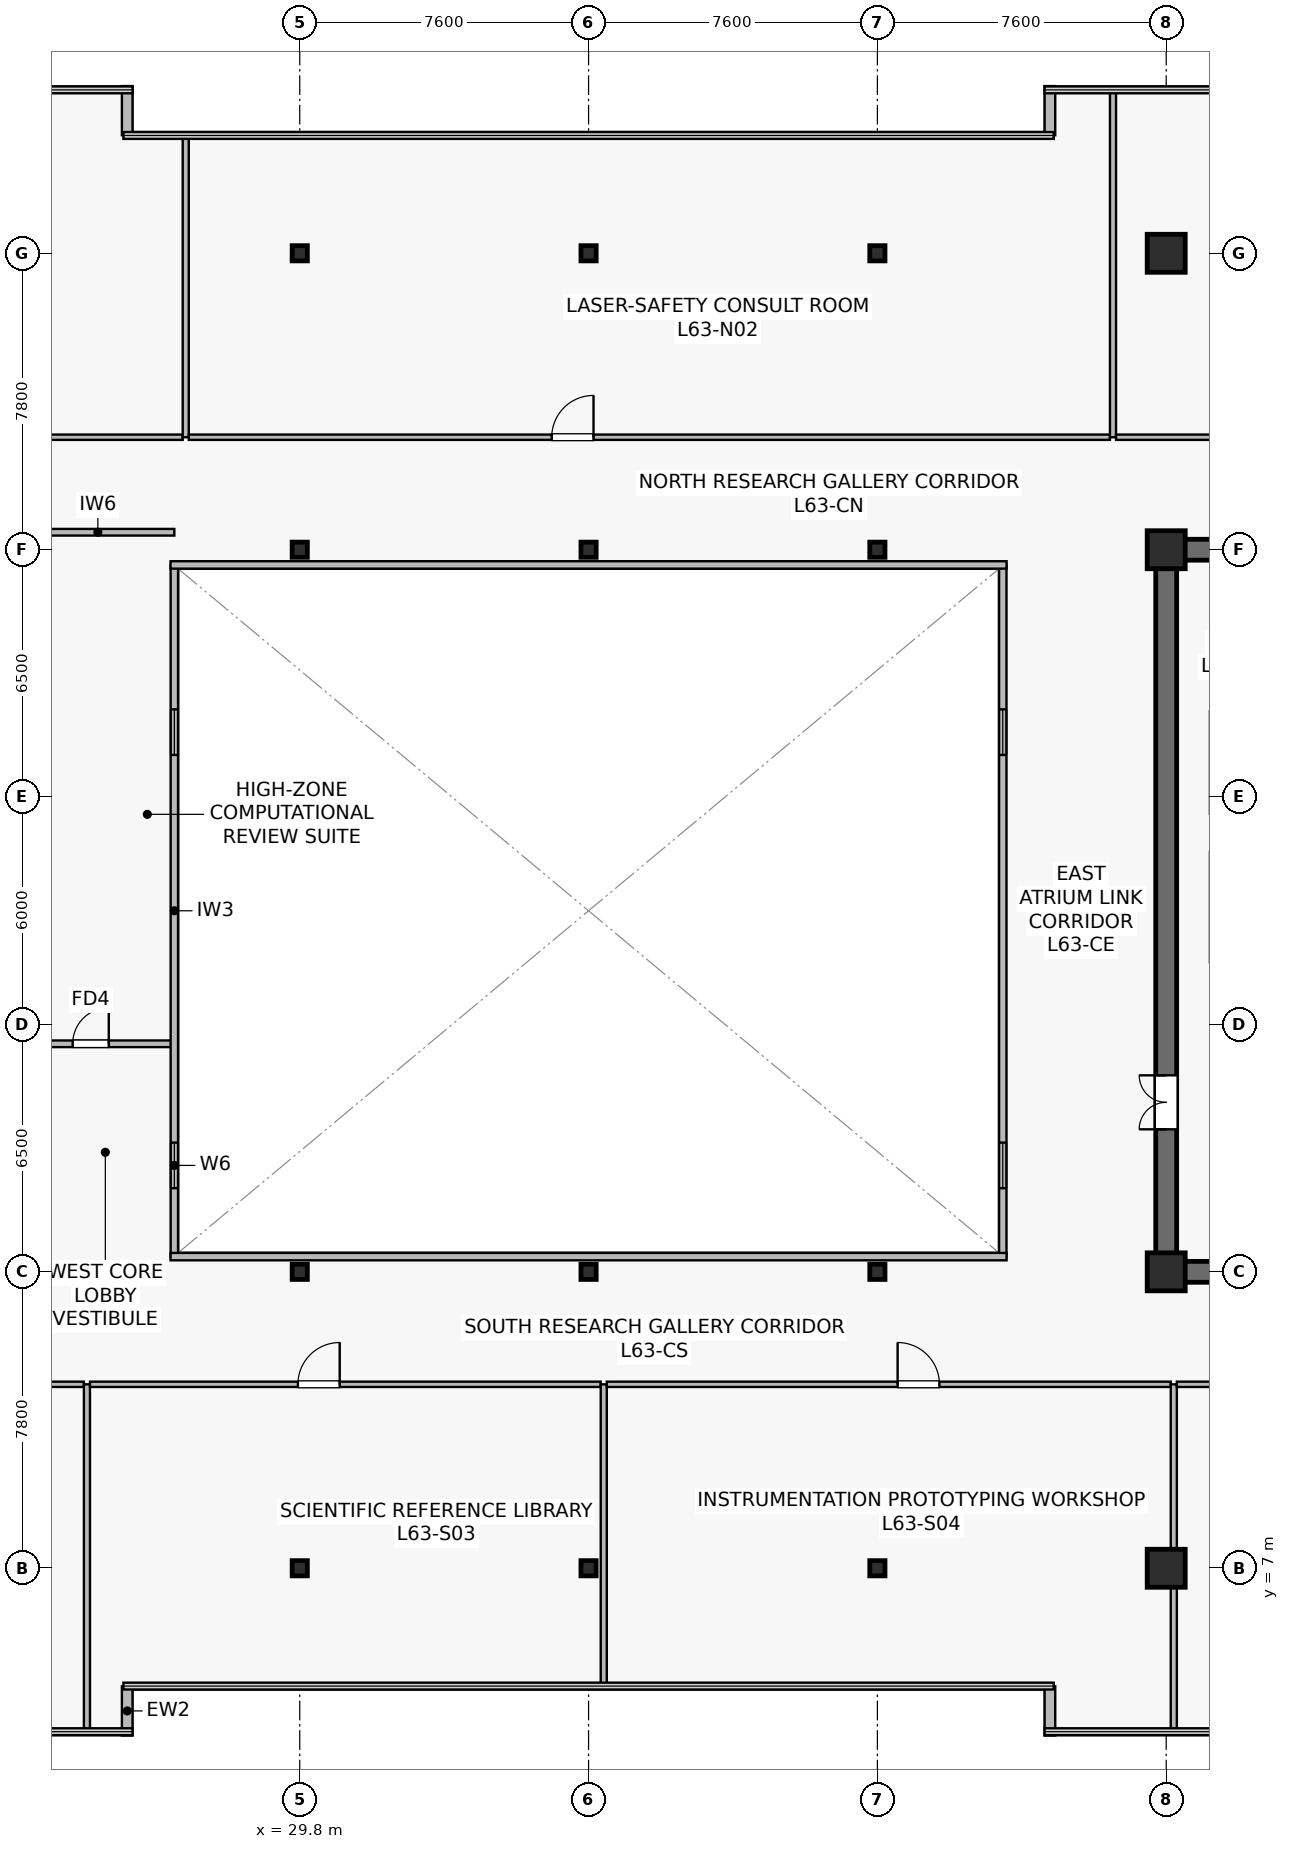
"""IFC4 building model, lengths in metres.
Left out: names, types, materials, properties, quantities, classifications, styles, units other than length and angle.
Written with IfcOpenShell. Run it as: python <this file> out.ifc"""

import sys

from ifc_helpers import new_model, si_unit, direction, frame, frame_2d, origin, origin_2d, place, context, subcontext, project, spatial, rectangle, hollow_rectangle, extrude, source, transform, mapped, element, fill, save


model = new_model("IFC4")
c1 = context("Model", 3, precision=1e-05, world=origin(), true_north=direction((0.0, 1.0)))
c2 = subcontext(c1, "Body", "Model", "MODEL_VIEW")
j1 = project(units=[si_unit("LENGTHUNIT", "METRE"), si_unit("PLANEANGLEUNIT", "RADIAN")], contexts=[c1])
p1 = place(None, origin())
s1 = spatial("IfcSite", under=j1, at=p1, CompositionType="ELEMENT")
p2 = place(p1, origin())
s2 = spatial("IfcBuilding", under=s1, at=p2, CompositionType="ELEMENT")
p3 = place(p2, frame((0.0, 0.0, 262.9)))
s3 = spatial("IfcBuildingStorey", under=s2, at=p3, CompositionType="ELEMENT", Elevation=262.9)
p4 = place(p3, frame((52.325, 14.8, 0.0), z_axis=(0.0, 0.0, 1.0), x_axis=(1.0, 0.0, 0.0)))
e1 = element("IfcWall", 1, at=p4, inside=s3, PredefinedType="SHEAR", context=c2, shape_type="SweptSolid", body=[
    extrude(rectangle(XDim=15.35, YDim=0.55, at=frame_2d((7.675, 0.0))), origin(), (0.0, 0.0, 1.0), 3.8),
])
p5 = place(p3, frame((52.325, 33.8, 0.0), z_axis=(0.0, 0.0, 1.0), x_axis=(1.0, 0.0, 0.0)))
e2 = element("IfcWall", 2, at=p5, inside=s3, PredefinedType="SHEAR", context=c2, shape_type="SweptSolid", body=[
    extrude(rectangle(XDim=15.35, YDim=0.55, at=frame_2d((7.675, 0.0))), origin(), (0.0, 0.0, 1.0), 3.8),
])
p6 = place(p5, frame((6.075, 0.0, 0.0)))
e3 = element("IfcOpeningElement", 3, at=p6, cuts=e2, PredefinedType="OPENING", context=c2, shape_type="SweptSolid", body=[
    extrude(rectangle(XDim=0.95, YDim=2.15, at=frame_2d((0.475, 1.075))), frame((0.0, 0.285, 0.0), z_axis=(0.0, -1.0, 0.0), x_axis=(1.0, 0.0, 0.0)), (0.0, 0.0, 1.0), 0.57),
])
p7 = place(p5, frame((2.535, 0.0, 0.0)))
e4 = element("IfcOpeningElement", 4, at=p7, cuts=e2, PredefinedType="OPENING", context=c2, shape_type="SweptSolid", body=[
    extrude(rectangle(XDim=0.95, YDim=2.15, at=frame_2d((0.475, 1.075))), frame((0.0, 0.285, 0.0), z_axis=(0.0, -1.0, 0.0), x_axis=(1.0, 0.0, 0.0)), (0.0, 0.0, 1.0), 0.57),
])
p8 = place(p3, frame((52.6, 15.075, 0.0), z_axis=(0.0, 0.0, 1.0), x_axis=(0.0, 1.0, 0.0)))
e5 = element("IfcWall", 5, at=p8, inside=s3, PredefinedType="SHEAR", context=c2, shape_type="SweptSolid", body=[
    extrude(rectangle(XDim=18.45, YDim=0.55, at=frame_2d((9.225, 0.0))), origin(), (0.0, 0.0, 1.0), 3.8),
])
p9 = place(p8, frame((3.475, 0.0, 0.0)))
e6 = element("IfcOpeningElement", 6, at=p9, cuts=e5, PredefinedType="OPENING", context=c2, shape_type="SweptSolid", body=[
    extrude(rectangle(XDim=1.42, YDim=2.2, at=frame_2d((0.71, 1.1))), frame((0.0, 0.285, 0.0), z_axis=(0.0, -1.0, 0.0), x_axis=(1.0, 0.0, 0.0)), (0.0, 0.0, 1.0), 0.57),
])
m1 = source(origin(), c2, "Body", "SweptSolid", [
    extrude(rectangle(XDim=1.0, YDim=1.0, at=origin_2d()), origin(), (0.0, 0.0, 1.0), 4.1),
])
for number, where, z_axis, x_axis in (
    (7, (52.6, 7.0, 0.0), (0.0, 0.0, 1.0), (1.0, 0.0, 0.0)),
    (8, (52.6, 14.8, 0.0), (0.0, 0.0, 1.0), (1.0, 0.0, 0.0)),
    (9, (52.6, 33.8, 0.0), (0.0, 0.0, 1.0), (1.0, 0.0, 0.0)),
    (10, (52.6, 41.6, 0.0), (0.0, 0.0, 1.0), (1.0, 0.0, 0.0)),
):
    element("IfcColumn", number, at=place(p3, frame(where, z_axis=z_axis, x_axis=x_axis)), inside=s3, PredefinedType="COLUMN", context=c2, shape_type="MappedRepresentation", body=[
        mapped(m1, transform((0.0, 0.0, 0.0), scale=1.0)),
    ])
m2 = source(origin(), c2, "Body", "SweptSolid", [
    extrude(hollow_rectangle(XDim=0.4, YDim=0.4, WallThickness=0.019, at=origin_2d()), origin(), (0.0, 0.0, 1.0), 4.1),
])
for number, where, z_axis, x_axis in (
    (11, (29.8, 7.0, 0.0), (0.0, 0.0, 1.0), (1.0, 0.0, 0.0)),
    (12, (29.8, 14.8, 0.0), (0.0, 0.0, 1.0), (1.0, 0.0, 0.0)),
    (13, (29.8, 33.8, 0.0), (0.0, 0.0, 1.0), (1.0, 0.0, 0.0)),
    (14, (29.8, 41.6, 0.0), (0.0, 0.0, 1.0), (1.0, 0.0, 0.0)),
    (15, (37.4, 7.0, 0.0), (0.0, 0.0, 1.0), (1.0, 0.0, 0.0)),
    (16, (37.4, 14.8, 0.0), (0.0, 0.0, 1.0), (1.0, 0.0, 0.0)),
    (17, (37.4, 33.8, 0.0), (0.0, 0.0, 1.0), (1.0, 0.0, 0.0)),
    (18, (37.4, 41.6, 0.0), (0.0, 0.0, 1.0), (1.0, 0.0, 0.0)),
    (19, (45.0, 7.0, 0.0), (0.0, 0.0, 1.0), (1.0, 0.0, 0.0)),
    (20, (45.0, 14.8, 0.0), (0.0, 0.0, 1.0), (1.0, 0.0, 0.0)),
    (21, (45.0, 33.8, 0.0), (0.0, 0.0, 1.0), (1.0, 0.0, 0.0)),
    (22, (45.0, 41.6, 0.0), (0.0, 0.0, 1.0), (1.0, 0.0, 0.0)),
):
    element("IfcColumn", number, at=place(p3, frame(where, z_axis=z_axis, x_axis=x_axis)), inside=s3, PredefinedType="COLUMN", context=c2, shape_type="MappedRepresentation", body=[
        mapped(m2, transform((0.0, 0.0, 0.0), scale=1.0)),
    ])
for number, where, z_axis, x_axis in (
    (23, (25.26, 2.6, 0.0), (0.0, 0.0, 1.0), (0.0, 1.0, 0.0)),
    (24, (49.54, 3.893, 0.0), (0.0, 0.0, 1.0), (0.0, -1.0, 0.0)),
    (25, (49.54, 46.0, 0.0), (0.0, 0.0, 1.0), (0.0, -1.0, 0.0)),
    (26, (25.26, 44.707, 0.0), (0.0, 0.0, 1.0), (0.0, 1.0, 0.0)),
):
    element("IfcWall", number, at=place(p3, frame(where, z_axis=z_axis, x_axis=x_axis)), inside=s3, PredefinedType="STANDARD", context=c2, shape_type="SweptSolid", body=[
        extrude(rectangle(XDim=1.293, YDim=0.28, at=frame_2d((0.646, 0.0))), origin(), (0.0, 0.0, 1.0), 3.8),
    ])
p10 = place(p3, frame((22.475, 34.26, 0.0), z_axis=(0.0, 0.0, 1.0), x_axis=(1.0, 0.0, 0.0)))
e27 = element("IfcWall", 27, at=p10, inside=s3, PredefinedType="PARTITIONING", context=c2, shape_type="SweptSolid", body=[
    extrude(rectangle(XDim=4.025, YDim=0.175, at=frame_2d((2.012, 0.0))), origin(), (0.0, 0.0, 1.0), 3.535),
])
p11 = place(p3, frame((22.475, 20.8, 0.0), z_axis=(0.0, 0.0, 1.0), x_axis=(1.0, 0.0, 0.0)))
e28 = element("IfcWall", 28, at=p11, inside=s3, PredefinedType="PARTITIONING", context=c2, shape_type="SweptSolid", body=[
    extrude(rectangle(XDim=4.025, YDim=0.175, at=frame_2d((2.012, 0.0))), origin(), (0.0, 0.0, 1.0), 3.8),
])
p12 = place(p11, frame((1.35, 0.0, 0.0)))
e29 = element("IfcOpeningElement", 29, at=p12, cuts=e28, PredefinedType="OPENING", context=c2, shape_type="SweptSolid", body=[
    extrude(rectangle(XDim=0.95, YDim=2.15, at=frame_2d((0.475, 1.075))), frame((0.0, 0.098, 0.0), z_axis=(0.0, -1.0, 0.0), x_axis=(1.0, 0.0, 0.0)), (0.0, 0.0, 1.0), 0.195),
])
p13 = place(p3, frame((26.5, 15.2, 0.0), z_axis=(0.0, 0.0, 1.0), x_axis=(0.0, 1.0, 0.0)))
e30 = element("IfcWall", 30, at=p13, inside=s3, PredefinedType="SOLIDWALL", context=c2, shape_type="SweptSolid", body=[
    extrude(rectangle(XDim=18.2, YDim=0.195, at=frame_2d((9.1, 0.0))), origin(), (0.0, 0.0, 1.0), 3.8),
])
p14 = place(p13, frame((1.8, 0.0, 0.9)))
e31 = element("IfcOpeningElement", 31, at=p14, cuts=e30, PredefinedType="OPENING", context=c2, shape_type="SweptSolid", body=[
    extrude(rectangle(XDim=1.2, YDim=1.35, at=frame_2d((0.6, 0.675))), frame((0.0, 0.107, 0.0), z_axis=(0.0, -1.0, 0.0), x_axis=(1.0, 0.0, 0.0)), (0.0, 0.0, 1.0), 0.215),
])
p15 = place(p13, frame((13.2, 0.0, 0.9)))
e32 = element("IfcOpeningElement", 32, at=p15, cuts=e30, PredefinedType="OPENING", context=c2, shape_type="SweptSolid", body=[
    extrude(rectangle(XDim=1.2, YDim=1.35, at=frame_2d((0.6, 0.675))), frame((0.0, 0.107, 0.0), z_axis=(0.0, -1.0, 0.0), x_axis=(1.0, 0.0, 0.0)), (0.0, 0.0, 1.0), 0.215),
])
p16 = place(p3, frame((48.3, 15.2, 0.0), z_axis=(0.0, 0.0, 1.0), x_axis=(0.0, 1.0, 0.0)))
e33 = element("IfcWall", 33, at=p16, inside=s3, PredefinedType="SOLIDWALL", context=c2, shape_type="SweptSolid", body=[
    extrude(rectangle(XDim=18.2, YDim=0.195, at=frame_2d((9.1, 0.0))), origin(), (0.0, 0.0, 1.0), 3.8),
])
p17 = place(p16, frame((1.8, 0.0, 0.9)))
e34 = element("IfcOpeningElement", 34, at=p17, cuts=e33, PredefinedType="OPENING", context=c2, shape_type="SweptSolid", body=[
    extrude(rectangle(XDim=1.2, YDim=1.35, at=frame_2d((0.6, 0.675))), frame((0.0, 0.107, 0.0), z_axis=(0.0, -1.0, 0.0), x_axis=(1.0, 0.0, 0.0)), (0.0, 0.0, 1.0), 0.215),
])
p18 = place(p16, frame((13.2, 0.0, 0.9)))
e35 = element("IfcOpeningElement", 35, at=p18, cuts=e33, PredefinedType="OPENING", context=c2, shape_type="SweptSolid", body=[
    extrude(rectangle(XDim=1.2, YDim=1.35, at=frame_2d((0.6, 0.675))), frame((0.0, 0.107, 0.0), z_axis=(0.0, -1.0, 0.0), x_axis=(1.0, 0.0, 0.0)), (0.0, 0.0, 1.0), 0.215),
])
for number, where, z_axis, x_axis in (
    (36, (26.4, 15.2, 0.0), (0.0, 0.0, 1.0), (1.0, 0.0, 0.0)),
    (37, (26.4, 33.4, 0.0), (0.0, 0.0, 1.0), (1.0, 0.0, 0.0)),
):
    element("IfcWall", number, at=place(p3, frame(where, z_axis=z_axis, x_axis=x_axis)), inside=s3, PredefinedType="SOLIDWALL", context=c2, shape_type="SweptSolid", body=[
        extrude(rectangle(XDim=22.0, YDim=0.195, at=frame_2d((11.0, 0.0))), origin(), (0.0, 0.0, 1.0), 3.8),
    ])
p19 = place(p3, frame((13.48, 11.84, 0.0), z_axis=(0.0, 0.0, 1.0), x_axis=(1.0, 0.0, 0.0)))
e38 = element("IfcWall", 38, at=p19, inside=s3, PredefinedType="PARTITIONING", context=c2, shape_type="SweptSolid", body=[
    extrude(rectangle(XDim=10.64, YDim=0.14, at=frame_2d((5.32, 0.0))), origin(), (0.0, 0.0, 1.0), 3.197),
])
p20 = place(p19, frame((5.3, 0.0, 0.0)))
e39 = element("IfcOpeningElement", 39, at=p20, cuts=e38, PredefinedType="OPENING", context=c2, shape_type="SweptSolid", body=[
    extrude(rectangle(XDim=1.1, YDim=2.18, at=frame_2d((0.55, 1.09))), frame((0.0, 0.08, 0.0), z_axis=(0.0, -1.0, 0.0), x_axis=(1.0, 0.0, 0.0)), (0.0, 0.0, 1.0), 0.16),
])
p21 = place(p3, frame((24.2, 2.71, 0.0), z_axis=(0.0, 0.0, 1.0), x_axis=(0.0, 1.0, 0.0)))
e40 = element("IfcWall", 40, at=p21, inside=s3, PredefinedType="PARTITIONING", context=c2, shape_type="SweptSolid", body=[
    extrude(rectangle(XDim=9.13, YDim=0.16, at=frame_2d((4.565, 0.0))), origin(), (0.0, 0.0, 1.0), 3.135),
])
p22 = place(p3, frame((24.28, 11.84, 0.0), z_axis=(0.0, 0.0, 1.0), x_axis=(1.0, 0.0, 0.0)))
e41 = element("IfcWall", 41, at=p22, inside=s3, PredefinedType="PARTITIONING", context=c2, shape_type="SweptSolid", body=[
    extrude(rectangle(XDim=13.44, YDim=0.14, at=frame_2d((6.72, 0.0))), origin(), (0.0, 0.0, 1.0), 3.197),
])
p23 = place(p22, frame((5.472, 0.0, 0.0)))
e42 = element("IfcOpeningElement", 42, at=p23, cuts=e41, PredefinedType="OPENING", context=c2, shape_type="SweptSolid", body=[
    extrude(rectangle(XDim=1.1, YDim=2.18, at=frame_2d((0.55, 1.09))), frame((0.0, 0.08, 0.0), z_axis=(0.0, -1.0, 0.0), x_axis=(1.0, 0.0, 0.0)), (0.0, 0.0, 1.0), 0.16),
])
p24 = place(p3, frame((37.8, 3.91, 0.0), z_axis=(0.0, 0.0, 1.0), x_axis=(0.0, 1.0, 0.0)))
e43 = element("IfcWall", 43, at=p24, inside=s3, PredefinedType="PARTITIONING", context=c2, shape_type="SweptSolid", body=[
    extrude(rectangle(XDim=7.93, YDim=0.16, at=frame_2d((3.965, 0.0))), origin(), (0.0, 0.0, 1.0), 3.135),
])
p25 = place(p3, frame((37.88, 11.84, 0.0), z_axis=(0.0, 0.0, 1.0), x_axis=(1.0, 0.0, 0.0)))
e44 = element("IfcWall", 44, at=p25, inside=s3, PredefinedType="PARTITIONING", context=c2, shape_type="SweptSolid", body=[
    extrude(rectangle(XDim=14.84, YDim=0.14, at=frame_2d((7.42, 0.0))), origin(), (0.0, 0.0, 1.0), 3.197),
])
p26 = place(p25, frame((7.652, 0.0, 0.0)))
e45 = element("IfcOpeningElement", 45, at=p26, cuts=e44, PredefinedType="OPENING", context=c2, shape_type="SweptSolid", body=[
    extrude(rectangle(XDim=1.1, YDim=2.18, at=frame_2d((0.55, 1.09))), frame((0.0, 0.08, 0.0), z_axis=(0.0, -1.0, 0.0), x_axis=(1.0, 0.0, 0.0)), (0.0, 0.0, 1.0), 0.16),
])
p27 = place(p3, frame((52.8, 2.71, 0.0), z_axis=(0.0, 0.0, 1.0), x_axis=(0.0, 1.0, 0.0)))
e46 = element("IfcWall", 46, at=p27, inside=s3, PredefinedType="PARTITIONING", context=c2, shape_type="SweptSolid", body=[
    extrude(rectangle(XDim=9.13, YDim=0.16, at=frame_2d((4.565, 0.0))), origin(), (0.0, 0.0, 1.0), 3.135),
])
p28 = place(p3, frame((52.88, 11.84, 0.0), z_axis=(0.0, 0.0, 1.0), x_axis=(1.0, 0.0, 0.0)))
e47 = element("IfcWall", 47, at=p28, inside=s3, PredefinedType="PARTITIONING", context=c2, shape_type="SweptSolid", body=[
    extrude(rectangle(XDim=14.61, YDim=0.14, at=frame_2d((7.305, 0.0))), origin(), (0.0, 0.0, 1.0), 3.197),
])
p29 = place(p28, frame((5.986, 0.0, 0.0)))
e48 = element("IfcOpeningElement", 48, at=p29, cuts=e47, PredefinedType="OPENING", context=c2, shape_type="SweptSolid", body=[
    extrude(rectangle(XDim=1.1, YDim=2.18, at=frame_2d((0.55, 1.09))), frame((0.0, 0.08, 0.0), z_axis=(0.0, -1.0, 0.0), x_axis=(1.0, 0.0, 0.0)), (0.0, 0.0, 1.0), 0.16),
])
p30 = place(p3, frame((7.31, 36.76, 0.0), z_axis=(0.0, 0.0, 1.0), x_axis=(1.0, 0.0, 0.0)))
e49 = element("IfcWall", 49, at=p30, inside=s3, PredefinedType="PARTITIONING", context=c2, shape_type="SweptSolid", body=[
    extrude(rectangle(XDim=19.41, YDim=0.14, at=frame_2d((9.705, 0.0))), origin(), (0.0, 0.0, 1.0), 3.197),
])
p31 = place(p30, frame((9.683, 0.0, 0.0)))
e50 = element("IfcOpeningElement", 50, at=p31, cuts=e49, PredefinedType="OPENING", context=c2, shape_type="SweptSolid", body=[
    extrude(rectangle(XDim=1.1, YDim=2.18, at=frame_2d((0.55, 1.09))), frame((0.0, 0.08, 0.0), z_axis=(0.0, -1.0, 0.0), x_axis=(1.0, 0.0, 0.0)), (0.0, 0.0, 1.0), 0.16),
])
p32 = place(p3, frame((26.8, 36.76, 0.0), z_axis=(0.0, 0.0, 1.0), x_axis=(0.0, 1.0, 0.0)))
e51 = element("IfcWall", 51, at=p32, inside=s3, PredefinedType="PARTITIONING", context=c2, shape_type="SweptSolid", body=[
    extrude(rectangle(XDim=7.93, YDim=0.16, at=frame_2d((3.965, 0.0))), origin(), (0.0, 0.0, 1.0), 3.135),
])
p33 = place(p3, frame((26.88, 36.76, 0.0), z_axis=(0.0, 0.0, 1.0), x_axis=(1.0, 0.0, 0.0)))
e52 = element("IfcWall", 52, at=p33, inside=s3, PredefinedType="PARTITIONING", context=c2, shape_type="SweptSolid", body=[
    extrude(rectangle(XDim=24.24, YDim=0.14, at=frame_2d((12.12, 0.0))), origin(), (0.0, 0.0, 1.0), 3.197),
])
p34 = place(p33, frame((9.55, 0.0, 0.0)))
e53 = element("IfcOpeningElement", 53, at=p34, cuts=e52, PredefinedType="OPENING", context=c2, shape_type="SweptSolid", body=[
    extrude(rectangle(XDim=1.1, YDim=2.18, at=frame_2d((0.55, 1.09))), frame((0.0, 0.08, 0.0), z_axis=(0.0, -1.0, 0.0), x_axis=(1.0, 0.0, 0.0)), (0.0, 0.0, 1.0), 0.16),
])
p35 = place(p3, frame((51.2, 36.76, 0.0), z_axis=(0.0, 0.0, 1.0), x_axis=(0.0, 1.0, 0.0)))
e54 = element("IfcWall", 54, at=p35, inside=s3, PredefinedType="PARTITIONING", context=c2, shape_type="SweptSolid", body=[
    extrude(rectangle(XDim=9.13, YDim=0.16, at=frame_2d((4.565, 0.0))), origin(), (0.0, 0.0, 1.0), 3.135),
])
p36 = place(p3, frame((51.28, 36.76, 0.0), z_axis=(0.0, 0.0, 1.0), x_axis=(1.0, 0.0, 0.0)))
e55 = element("IfcWall", 55, at=p36, inside=s3, PredefinedType="PARTITIONING", context=c2, shape_type="SweptSolid", body=[
    extrude(rectangle(XDim=16.21, YDim=0.14, at=frame_2d((8.105, 0.0))), origin(), (0.0, 0.0, 1.0), 3.197),
])
p37 = place(p36, frame((7.987, 0.0, 0.0)))
e56 = element("IfcOpeningElement", 56, at=p37, cuts=e55, PredefinedType="OPENING", context=c2, shape_type="SweptSolid", body=[
    extrude(rectangle(XDim=1.1, YDim=2.18, at=frame_2d((0.55, 1.09))), frame((0.0, 0.08, 0.0), z_axis=(0.0, -1.0, 0.0), x_axis=(1.0, 0.0, 0.0)), (0.0, 0.0, 1.0), 0.16),
])
m3 = source(origin(), c2, "Body", "SweptSolid", [
    extrude(rectangle(XDim=1.2, YDim=1.35, at=frame_2d((0.6, 0.675))), frame((0.0, 0.03, 0.0), z_axis=(0.0, -1.0, 0.0), x_axis=(1.0, 0.0, 0.0)), (0.0, 0.0, 1.0), 0.06),
])
p38 = place(p14, origin())
e57 = element("IfcWindow", 57, at=p38, inside=s3, PartitioningType="SINGLE_PANEL", PredefinedType="WINDOW", context=c2, shape_type="MappedRepresentation", body=[
    mapped(m3, transform((0.0, 0.0, 0.0), scale=1.0)),
])
fill(e31, e57)
p39 = place(p15, origin())
e58 = element("IfcWindow", 58, at=p39, inside=s3, PartitioningType="SINGLE_PANEL", PredefinedType="WINDOW", context=c2, shape_type="MappedRepresentation", body=[
    mapped(m3, transform((0.0, 0.0, 0.0), scale=1.0)),
])
fill(e32, e58)
p40 = place(p17, origin())
e59 = element("IfcWindow", 59, at=p40, inside=s3, PartitioningType="SINGLE_PANEL", PredefinedType="WINDOW", context=c2, shape_type="MappedRepresentation", body=[
    mapped(m3, transform((0.0, 0.0, 0.0), scale=1.0)),
])
fill(e34, e59)
p41 = place(p18, origin())
e60 = element("IfcWindow", 60, at=p41, inside=s3, PartitioningType="SINGLE_PANEL", PredefinedType="WINDOW", context=c2, shape_type="MappedRepresentation", body=[
    mapped(m3, transform((0.0, 0.0, 0.0), scale=1.0)),
])
fill(e35, e60)
m4 = source(origin(), c2, "Body", "SweptSolid", [
    extrude(rectangle(XDim=1.42, YDim=2.2, at=frame_2d((0.71, 1.1))), frame((0.0, 0.025, 0.0), z_axis=(0.0, -1.0, 0.0), x_axis=(1.0, 0.0, 0.0)), (0.0, 0.0, 1.0), 0.05),
])
p42 = place(p9, origin())
e61 = element("IfcDoor", 61, at=p42, inside=s3, OperationType="DOUBLE_DOOR_SINGLE_SWING", PredefinedType="DOOR", context=c2, shape_type="MappedRepresentation", body=[
    mapped(m4, transform((0.0, 0.0, 0.0), scale=1.0)),
])
fill(e6, e61)
m5 = source(origin(), c2, "Body", "SweptSolid", [
    extrude(rectangle(XDim=0.95, YDim=2.15, at=frame_2d((0.475, 1.075))), frame((0.0, 0.025, 0.0), z_axis=(0.0, -1.0, 0.0), x_axis=(1.0, 0.0, 0.0)), (0.0, 0.0, 1.0), 0.05),
])
p43 = place(p12, origin())
e62 = element("IfcDoor", 62, at=p43, inside=s3, OperationType="SINGLE_SWING_RIGHT", PredefinedType="DOOR", context=c2, shape_type="MappedRepresentation", body=[
    mapped(m5, transform((0.0, 0.0, 0.0), scale=1.0)),
])
fill(e29, e62)
m6 = source(origin(), c2, "Body", "SweptSolid", [
    extrude(rectangle(XDim=1.1, YDim=2.18, at=frame_2d((0.55, 1.09))), frame((0.0, 0.025, 0.0), z_axis=(0.0, -1.0, 0.0), x_axis=(1.0, 0.0, 0.0)), (0.0, 0.0, 1.0), 0.05),
])
p44 = place(p23, origin())
e63 = element("IfcDoor", 63, at=p44, inside=s3, OperationType="SINGLE_SWING_RIGHT", PredefinedType="DOOR", context=c2, shape_type="MappedRepresentation", body=[
    mapped(m6, transform((0.0, 0.0, 0.0), scale=1.0)),
])
fill(e42, e63)
p45 = place(p26, origin())
e64 = element("IfcDoor", 64, at=p45, inside=s3, OperationType="SINGLE_SWING_LEFT", PredefinedType="DOOR", context=c2, shape_type="MappedRepresentation", body=[
    mapped(m6, transform((0.0, 0.0, 0.0), scale=1.0)),
])
fill(e45, e64)
p46 = place(p34, origin())
e65 = element("IfcDoor", 65, at=p46, inside=s3, OperationType="SINGLE_SWING_RIGHT", PredefinedType="DOOR", context=c2, shape_type="MappedRepresentation", body=[
    mapped(m6, transform((0.0, 0.0, 0.0), scale=1.0)),
])
fill(e53, e65)
save(model, sys.argv[1])
